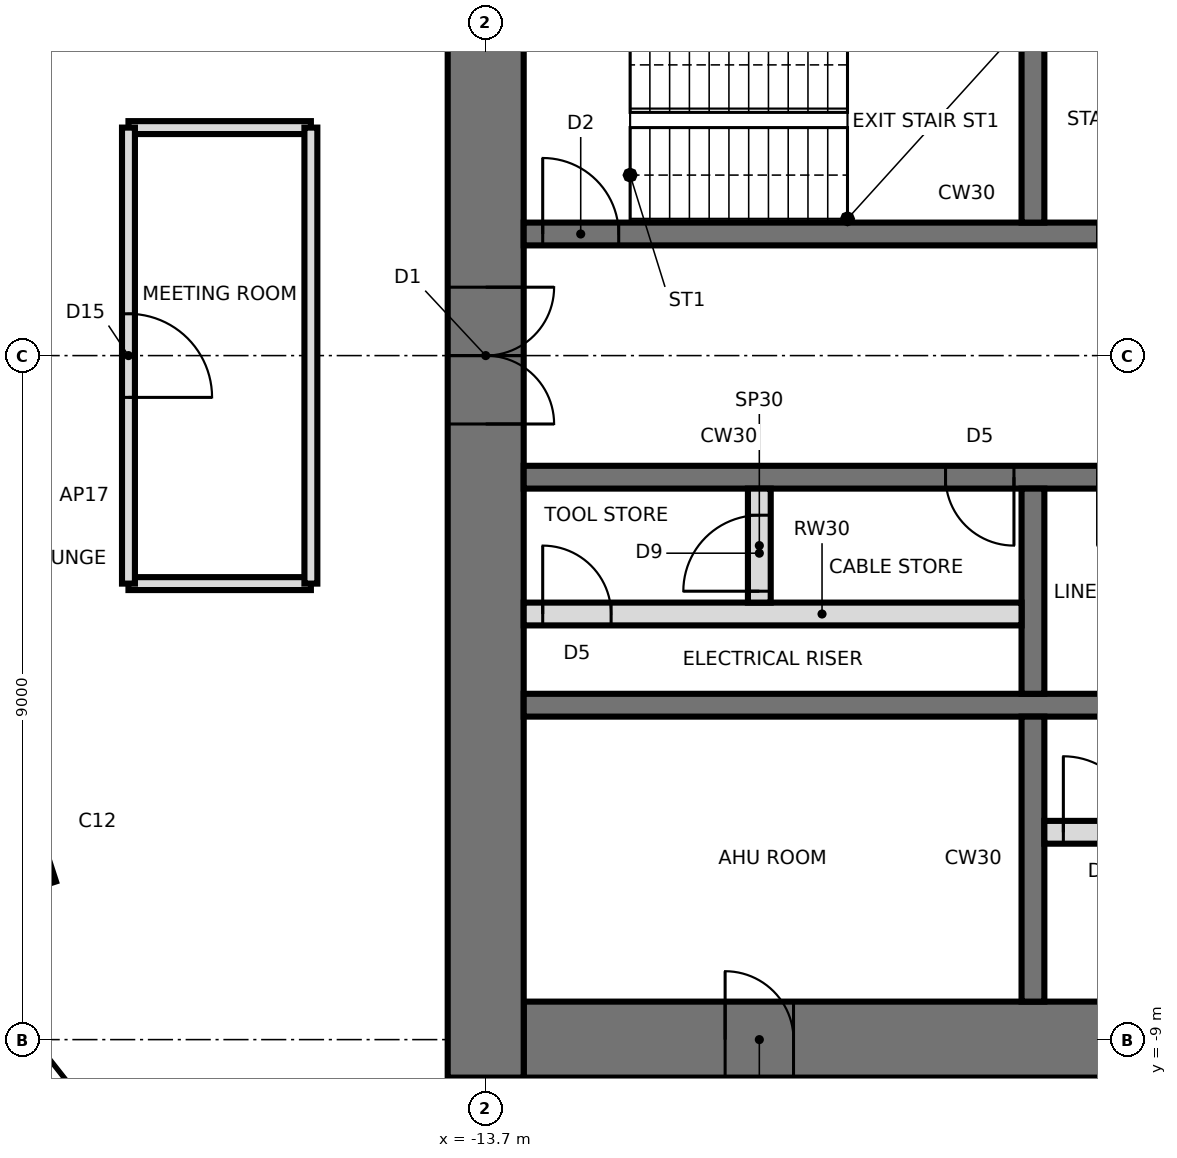
"""IFC4 building model, lengths in metres.
Left out: names, types, materials, properties, quantities, classifications, styles, units other than length and angle.
Written with IfcOpenShell. Run it as: python <this file> out.ifc"""

import sys

from ifc_helpers import new_model, si_unit, direction, frame, frame_2d, origin, origin_2d, place, context, subcontext, project, spatial, rectangle, extrude, element, fill, save


model = new_model("IFC4")
c1 = context("Model", 3, precision=1e-05, world=origin(), true_north=direction((0.0, 1.0)))
c2 = subcontext(c1, "Body", "Model", "MODEL_VIEW")
j1 = project(units=[si_unit("LENGTHUNIT", "METRE"), si_unit("PLANEANGLEUNIT", "RADIAN")], contexts=[c1])
p1 = place(None, origin())
s1 = spatial("IfcSite", under=j1, at=p1, CompositionType="ELEMENT")
p2 = place(p1, origin())
s2 = spatial("IfcBuilding", under=s1, at=p2, CompositionType="ELEMENT")
p3 = place(p2, frame((0.0, 0.0, 256.0)))
s3 = spatial("IfcBuildingStorey", under=s2, at=p3, CompositionType="ELEMENT", Elevation=256.0)
p4 = place(p3, frame((-20.109, -6.534, 0.0), z_axis=(0.0, 0.0, 1.0), x_axis=(-0.951056516295, -0.309016994375, 0.0)))
e1 = element("IfcColumn", 1, at=p4, inside=s3, PredefinedType="COLUMN", context=c2, shape_type="SweptSolid", body=[
    extrude(rectangle(XDim=1.2, YDim=1.2, at=origin_2d()), origin(), (0.0, 0.0, 1.0), 4.2),
])
p5 = place(p3, frame((-13.2, -9.0, 0.0), z_axis=(0.0, 0.0, 1.0), x_axis=(1.0, 0.0, 0.0)))
e2 = element("IfcWall", 2, at=p5, inside=s3, PredefinedType="SHEAR", context=c2, shape_type="SweptSolid", body=[
    extrude(rectangle(XDim=26.4, YDim=1.0, at=frame_2d((13.2, 0.0))), origin(), (0.0, 0.0, 1.0), 4.2),
])
p6 = place(p5, frame((2.65, 0.0, 0.0)))
e3 = element("IfcOpeningElement", 3, at=p6, cuts=e2, PredefinedType="OPENING", context=c2, shape_type="SweptSolid", body=[
    extrude(rectangle(XDim=0.9, YDim=2.1, at=frame_2d((0.45, 1.05))), frame((0.0, 0.51, 0.0), z_axis=(0.0, -1.0, 0.0), x_axis=(1.0, 0.0, 0.0)), (0.0, 0.0, 1.0), 1.02),
])
p7 = place(p5, frame((9.5, 0.0, 0.0)))
e4 = element("IfcOpeningElement", 4, at=p7, cuts=e2, PredefinedType="OPENING", context=c2, shape_type="SweptSolid", body=[
    extrude(rectangle(XDim=0.9, YDim=2.1, at=frame_2d((0.45, 1.05))), frame((0.0, 0.51, 0.0), z_axis=(0.0, -1.0, 0.0), x_axis=(1.0, 0.0, 0.0)), (0.0, 0.0, 1.0), 1.02),
])
p8 = place(p5, frame((16.0, 0.0, 0.0)))
e5 = element("IfcOpeningElement", 5, at=p8, cuts=e2, PredefinedType="OPENING", context=c2, shape_type="SweptSolid", body=[
    extrude(rectangle(XDim=0.9, YDim=2.1, at=frame_2d((0.45, 1.05))), frame((0.0, 0.51, 0.0), z_axis=(0.0, -1.0, 0.0), x_axis=(1.0, 0.0, 0.0)), (0.0, 0.0, 1.0), 1.02),
])
p9 = place(p5, frame((22.85, 0.0, 0.0)))
e6 = element("IfcOpeningElement", 6, at=p9, cuts=e2, PredefinedType="OPENING", context=c2, shape_type="SweptSolid", body=[
    extrude(rectangle(XDim=0.9, YDim=2.1, at=frame_2d((0.45, 1.05))), frame((0.0, 0.51, 0.0), z_axis=(0.0, -1.0, 0.0), x_axis=(1.0, 0.0, 0.0)), (0.0, 0.0, 1.0), 1.02),
])
p10 = place(p3, frame((-13.7, 9.5, 0.0), z_axis=(0.0, 0.0, 1.0), x_axis=(0.0, -1.0, 0.0)))
e7 = element("IfcWall", 7, at=p10, inside=s3, PredefinedType="SHEAR", context=c2, shape_type="SweptSolid", body=[
    extrude(rectangle(XDim=19.0, YDim=1.0, at=frame_2d((9.5, 0.0))), origin(), (0.0, 0.0, 1.0), 4.2),
])
p11 = place(p10, frame((8.6, 0.0, 0.0)))
e8 = element("IfcOpeningElement", 8, at=p11, cuts=e7, PredefinedType="OPENING", context=c2, shape_type="SweptSolid", body=[
    extrude(rectangle(XDim=1.8, YDim=2.4, at=frame_2d((0.9, 1.2))), frame((0.0, 0.51, 0.0), z_axis=(0.0, -1.0, 0.0), x_axis=(1.0, 0.0, 0.0)), (0.0, 0.0, 1.0), 1.02),
])
p12 = place(p3, frame((-13.2, 1.6, 0.0), z_axis=(0.0, 0.0, 1.0), x_axis=(1.0, 0.0, 0.0)))
e9 = element("IfcWall", 9, at=p12, inside=s3, PredefinedType="SHEAR", context=c2, shape_type="SweptSolid", body=[
    extrude(rectangle(XDim=26.4, YDim=0.3, at=frame_2d((13.2, 0.0))), origin(), (0.0, 0.0, 1.0), 4.2),
])
p13 = place(p12, frame((0.25, 0.0, 0.0)))
e10 = element("IfcOpeningElement", 10, at=p13, cuts=e9, PredefinedType="OPENING", context=c2, shape_type="SweptSolid", body=[
    extrude(rectangle(XDim=1.0, YDim=2.1, at=frame_2d((0.5, 1.05))), frame((0.0, 0.16, 0.0), z_axis=(0.0, -1.0, 0.0), x_axis=(1.0, 0.0, 0.0)), (0.0, 0.0, 1.0), 0.32),
])
p14 = place(p12, frame((20.25, 0.0, 0.0)))
e11 = element("IfcOpeningElement", 11, at=p14, cuts=e9, PredefinedType="OPENING", context=c2, shape_type="SweptSolid", body=[
    extrude(rectangle(XDim=1.5, YDim=2.4, at=frame_2d((0.75, 1.2))), frame((0.0, 0.16, 0.0), z_axis=(0.0, -1.0, 0.0), x_axis=(1.0, 0.0, 0.0)), (0.0, 0.0, 1.0), 0.32),
])
p15 = place(p12, frame((7.55, 0.0, 0.0)))
e12 = element("IfcOpeningElement", 12, at=p15, cuts=e9, PredefinedType="OPENING", context=c2, shape_type="SweptSolid", body=[
    extrude(rectangle(XDim=0.9, YDim=2.1, at=frame_2d((0.45, 1.05))), frame((0.0, 0.16, 0.0), z_axis=(0.0, -1.0, 0.0), x_axis=(1.0, 0.0, 0.0)), (0.0, 0.0, 1.0), 0.32),
])
p16 = place(p12, frame((10.15, 0.0, 0.0)))
e13 = element("IfcOpeningElement", 13, at=p16, cuts=e9, PredefinedType="OPENING", context=c2, shape_type="SweptSolid", body=[
    extrude(rectangle(XDim=0.9, YDim=2.1, at=frame_2d((0.45, 1.05))), frame((0.0, 0.16, 0.0), z_axis=(0.0, -1.0, 0.0), x_axis=(1.0, 0.0, 0.0)), (0.0, 0.0, 1.0), 0.32),
])
p17 = place(p12, frame((12.75, 0.0, 0.0)))
e14 = element("IfcOpeningElement", 14, at=p17, cuts=e9, PredefinedType="OPENING", context=c2, shape_type="SweptSolid", body=[
    extrude(rectangle(XDim=0.9, YDim=2.1, at=frame_2d((0.45, 1.05))), frame((0.0, 0.16, 0.0), z_axis=(0.0, -1.0, 0.0), x_axis=(1.0, 0.0, 0.0)), (0.0, 0.0, 1.0), 0.32),
])
p18 = place(p12, frame((15.25, 0.0, 0.0)))
e15 = element("IfcOpeningElement", 15, at=p18, cuts=e9, PredefinedType="OPENING", context=c2, shape_type="SweptSolid", body=[
    extrude(rectangle(XDim=1.1, YDim=2.3, at=frame_2d((0.55, 1.15))), frame((0.0, 0.16, 0.0), z_axis=(0.0, -1.0, 0.0), x_axis=(1.0, 0.0, 0.0)), (0.0, 0.0, 1.0), 0.32),
])
p19 = place(p12, frame((17.85, 0.0, 0.0)))
e16 = element("IfcOpeningElement", 16, at=p19, cuts=e9, PredefinedType="OPENING", context=c2, shape_type="SweptSolid", body=[
    extrude(rectangle(XDim=1.1, YDim=2.3, at=frame_2d((0.55, 1.15))), frame((0.0, 0.16, 0.0), z_axis=(0.0, -1.0, 0.0), x_axis=(1.0, 0.0, 0.0)), (0.0, 0.0, 1.0), 0.32),
])
p20 = place(p12, frame((24.15, 0.0, 0.0)))
e17 = element("IfcOpeningElement", 17, at=p20, cuts=e9, PredefinedType="OPENING", context=c2, shape_type="SweptSolid", body=[
    extrude(rectangle(XDim=0.9, YDim=2.1, at=frame_2d((0.45, 1.05))), frame((0.0, 0.16, 0.0), z_axis=(0.0, -1.0, 0.0), x_axis=(1.0, 0.0, 0.0)), (0.0, 0.0, 1.0), 0.32),
])
p21 = place(p3, frame((-13.2, -1.6, 0.0), z_axis=(0.0, 0.0, 1.0), x_axis=(1.0, 0.0, 0.0)))
e18 = element("IfcWall", 18, at=p21, inside=s3, PredefinedType="SHEAR", context=c2, shape_type="SweptSolid", body=[
    extrude(rectangle(XDim=26.4, YDim=0.3, at=frame_2d((13.2, 0.0))), origin(), (0.0, 0.0, 1.0), 4.2),
])
p22 = place(p21, frame((25.15, 0.0, 0.0)))
e19 = element("IfcOpeningElement", 19, at=p22, cuts=e18, PredefinedType="OPENING", context=c2, shape_type="SweptSolid", body=[
    extrude(rectangle(XDim=1.0, YDim=2.1, at=frame_2d((0.5, 1.05))), frame((0.0, 0.16, 0.0), z_axis=(0.0, -1.0, 0.0), x_axis=(1.0, 0.0, 0.0)), (0.0, 0.0, 1.0), 0.32),
])
p23 = place(p21, frame((7.55, 0.0, 0.0)))
e20 = element("IfcOpeningElement", 20, at=p23, cuts=e18, PredefinedType="OPENING", context=c2, shape_type="SweptSolid", body=[
    extrude(rectangle(XDim=0.9, YDim=2.1, at=frame_2d((0.45, 1.05))), frame((0.0, 0.16, 0.0), z_axis=(0.0, -1.0, 0.0), x_axis=(1.0, 0.0, 0.0)), (0.0, 0.0, 1.0), 0.32),
])
p24 = place(p21, frame((10.15, 0.0, 0.0)))
e21 = element("IfcOpeningElement", 21, at=p24, cuts=e18, PredefinedType="OPENING", context=c2, shape_type="SweptSolid", body=[
    extrude(rectangle(XDim=0.9, YDim=2.1, at=frame_2d((0.45, 1.05))), frame((0.0, 0.16, 0.0), z_axis=(0.0, -1.0, 0.0), x_axis=(1.0, 0.0, 0.0)), (0.0, 0.0, 1.0), 0.32),
])
p25 = place(p21, frame((12.75, 0.0, 0.0)))
e22 = element("IfcOpeningElement", 22, at=p25, cuts=e18, PredefinedType="OPENING", context=c2, shape_type="SweptSolid", body=[
    extrude(rectangle(XDim=0.9, YDim=2.1, at=frame_2d((0.45, 1.05))), frame((0.0, 0.16, 0.0), z_axis=(0.0, -1.0, 0.0), x_axis=(1.0, 0.0, 0.0)), (0.0, 0.0, 1.0), 0.32),
])
p26 = place(p21, frame((15.25, 0.0, 0.0)))
e23 = element("IfcOpeningElement", 23, at=p26, cuts=e18, PredefinedType="OPENING", context=c2, shape_type="SweptSolid", body=[
    extrude(rectangle(XDim=1.1, YDim=2.3, at=frame_2d((0.55, 1.15))), frame((0.0, 0.16, 0.0), z_axis=(0.0, -1.0, 0.0), x_axis=(1.0, 0.0, 0.0)), (0.0, 0.0, 1.0), 0.32),
])
p27 = place(p21, frame((17.85, 0.0, 0.0)))
e24 = element("IfcOpeningElement", 24, at=p27, cuts=e18, PredefinedType="OPENING", context=c2, shape_type="SweptSolid", body=[
    extrude(rectangle(XDim=1.1, YDim=2.3, at=frame_2d((0.55, 1.15))), frame((0.0, 0.16, 0.0), z_axis=(0.0, -1.0, 0.0), x_axis=(1.0, 0.0, 0.0)), (0.0, 0.0, 1.0), 0.32),
])
p28 = place(p21, frame((5.55, 0.0, 0.0)))
e25 = element("IfcOpeningElement", 25, at=p28, cuts=e18, PredefinedType="OPENING", context=c2, shape_type="SweptSolid", body=[
    extrude(rectangle(XDim=0.9, YDim=2.1, at=frame_2d((0.45, 1.05))), frame((0.0, 0.16, 0.0), z_axis=(0.0, -1.0, 0.0), x_axis=(1.0, 0.0, 0.0)), (0.0, 0.0, 1.0), 0.32),
])
p29 = place(p3, frame((-13.2, -4.6, 0.0), z_axis=(0.0, 0.0, 1.0), x_axis=(1.0, 0.0, 0.0)))
e26 = element("IfcWall", 26, at=p29, inside=s3, PredefinedType="SHEAR", context=c2, shape_type="SweptSolid", body=[
    extrude(rectangle(XDim=26.4, YDim=0.3, at=frame_2d((13.2, 0.0))), origin(), (0.0, 0.0, 1.0), 4.2),
])
for number, where, z_axis, x_axis in (
    (27, (-6.5, 1.75, 0.0), (0.0, 0.0, 1.0), (0.0, 1.0, 0.0)),
    (28, (-6.5, -1.75, 0.0), (0.0, 0.0, 1.0), (0.0, -1.0, 0.0)),
):
    element("IfcWall", number, at=place(p3, frame(where, z_axis=z_axis, x_axis=x_axis)), inside=s3, PredefinedType="SHEAR", context=c2, shape_type="SweptSolid", body=[
        extrude(rectangle(XDim=2.7, YDim=0.3, at=frame_2d((1.35, 0.0))), origin(), (0.0, 0.0, 1.0), 4.2),
    ])
p30 = place(p3, frame((-6.5, -4.75, 0.0), z_axis=(0.0, 0.0, 1.0), x_axis=(0.0, -1.0, 0.0)))
e29 = element("IfcWall", 29, at=p30, inside=s3, PredefinedType="SHEAR", context=c2, shape_type="SweptSolid", body=[
    extrude(rectangle(XDim=3.75, YDim=0.3, at=frame_2d((1.875, 0.0))), origin(), (0.0, 0.0, 1.0), 4.2),
])
p31 = place(p3, frame((-6.35, -6.272, 0.0), z_axis=(0.0, 0.0, 1.0), x_axis=(1.0, 0.0, 0.0)))
e30 = element("IfcWall", 30, at=p31, inside=s3, PredefinedType="PARTITIONING", context=c2, shape_type="SweptSolid", body=[
    extrude(rectangle(XDim=6.2, YDim=0.3, at=frame_2d((3.1, 0.0))), origin(), (0.0, 0.0, 1.0), 4.04),
])
p32 = place(p31, frame((0.25, 0.0, 0.0)))
e31 = element("IfcOpeningElement", 31, at=p32, cuts=e30, PredefinedType="OPENING", context=c2, shape_type="SweptSolid", body=[
    extrude(rectangle(XDim=1.0, YDim=2.4, at=frame_2d((0.5, 1.2))), frame((0.0, 0.16, 0.0), z_axis=(0.0, -1.0, 0.0), x_axis=(1.0, 0.0, 0.0)), (0.0, 0.0, 1.0), 0.32),
])
p33 = place(p3, frame((-13.2, -3.4, 0.0), z_axis=(0.0, 0.0, 1.0), x_axis=(1.0, 0.0, 0.0)))
e32 = element("IfcWall", 32, at=p33, inside=s3, PredefinedType="SOLIDWALL", context=c2, shape_type="SweptSolid", body=[
    extrude(rectangle(XDim=6.55, YDim=0.3, at=frame_2d((3.275, 0.0))), origin(), (0.0, 0.0, 1.0), 4.04),
])
p34 = place(p33, frame((0.25, 0.0, 0.0)))
e33 = element("IfcOpeningElement", 33, at=p34, cuts=e32, PredefinedType="OPENING", context=c2, shape_type="SweptSolid", body=[
    extrude(rectangle(XDim=0.9, YDim=2.1, at=frame_2d((0.45, 1.05))), frame((0.0, 0.16, 0.0), z_axis=(0.0, -1.0, 0.0), x_axis=(1.0, 0.0, 0.0)), (0.0, 0.0, 1.0), 0.32),
])
p35 = place(p3, frame((-10.1, -3.25, 0.0), z_axis=(0.0, 0.0, 1.0), x_axis=(0.0, 1.0, 0.0)))
e34 = element("IfcWall", 34, at=p35, inside=s3, PredefinedType="PARTITIONING", context=c2, shape_type="SweptSolid", body=[
    extrude(rectangle(XDim=1.5, YDim=0.3, at=frame_2d((0.75, 0.0))), origin(), (0.0, 0.0, 1.0), 4.04),
])
p36 = place(p35, frame((0.15, 0.0, 0.0)))
e35 = element("IfcOpeningElement", 35, at=p36, cuts=e34, PredefinedType="OPENING", context=c2, shape_type="SweptSolid", body=[
    extrude(rectangle(XDim=1.0, YDim=2.4, at=frame_2d((0.5, 1.2))), frame((0.0, 0.16, 0.0), z_axis=(0.0, -1.0, 0.0), x_axis=(1.0, 0.0, 0.0)), (0.0, 0.0, 1.0), 0.32),
])
for number, where, z_axis, x_axis in (
    (36, (-16.0, -3.0, 0.0), (0.0, 0.0, 1.0), (-1.0, 0.0, 0.0)),
    (37, (-18.4, 3.0, 0.0), (0.0, 0.0, 1.0), (1.0, 0.0, 0.0)),
):
    element("IfcWall", number, at=place(p3, frame(where, z_axis=z_axis, x_axis=x_axis)), inside=s3, PredefinedType="PARTITIONING", context=c2, shape_type="SweptSolid", body=[
        extrude(rectangle(XDim=2.4, YDim=0.17, at=frame_2d((1.2, 0.0))), origin(), (0.0, 0.0, 1.0), 4.04),
    ])
p37 = place(p3, frame((-18.4, -3.0, 0.0), z_axis=(0.0, 0.0, 1.0), x_axis=(0.0, 1.0, 0.0)))
e38 = element("IfcWall", 38, at=p37, inside=s3, PredefinedType="PARTITIONING", context=c2, shape_type="SweptSolid", body=[
    extrude(rectangle(XDim=6.0, YDim=0.17, at=frame_2d((3.0, 0.0))), origin(), (0.0, 0.0, 1.0), 4.04),
])
p38 = place(p37, frame((2.45, 0.0, 0.0)))
e39 = element("IfcOpeningElement", 39, at=p38, cuts=e38, PredefinedType="OPENING", context=c2, shape_type="SweptSolid", body=[
    extrude(rectangle(XDim=1.1, YDim=2.4, at=frame_2d((0.55, 1.2))), frame((0.0, 0.095, 0.0), z_axis=(0.0, -1.0, 0.0), x_axis=(1.0, 0.0, 0.0)), (0.0, 0.0, 1.0), 0.19),
])
p39 = place(p3, frame((-16.0, 3.0, 0.0), z_axis=(0.0, 0.0, 1.0), x_axis=(0.0, -1.0, 0.0)))
e40 = element("IfcWall", 40, at=p39, inside=s3, PredefinedType="PARTITIONING", context=c2, shape_type="SweptSolid", body=[
    extrude(rectangle(XDim=6.0, YDim=0.17, at=frame_2d((3.0, 0.0))), origin(), (0.0, 0.0, 1.0), 4.04),
])
p40 = place(p11, origin())
e41 = element("IfcDoor", 41, at=p40, inside=s3, OperationType="DOUBLE_DOOR_SINGLE_SWING", PredefinedType="DOOR", context=c2, shape_type="SweptSolid", body=[
    extrude(rectangle(XDim=1.72, YDim=2.36, at=frame_2d((0.9, 1.18))), frame((0.0, 0.025, 0.0), z_axis=(0.0, -1.0, 0.0), x_axis=(1.0, 0.0, 0.0)), (0.0, 0.0, 1.0), 0.05),
    extrude(rectangle(XDim=0.04, YDim=2.4, at=frame_2d((0.02, 1.2))), frame((0.0, 0.25, 0.0), z_axis=(0.0, -1.0, 0.0), x_axis=(1.0, 0.0, 0.0)), (0.0, 0.0, 1.0), 0.5),
    extrude(rectangle(XDim=0.04, YDim=2.4, at=frame_2d((1.78, 1.2))), frame((0.0, 0.25, 0.0), z_axis=(0.0, -1.0, 0.0), x_axis=(1.0, 0.0, 0.0)), (0.0, 0.0, 1.0), 0.5),
    extrude(rectangle(XDim=1.72, YDim=0.04, at=frame_2d((0.9, 2.38))), frame((0.0, 0.25, 0.0), z_axis=(0.0, -1.0, 0.0), x_axis=(1.0, 0.0, 0.0)), (0.0, 0.0, 1.0), 0.5),
])
fill(e8, e41)
p41 = place(p13, origin())
e42 = element("IfcDoor", 42, at=p41, inside=s3, OperationType="SINGLE_SWING_LEFT", PredefinedType="DOOR", context=c2, shape_type="SweptSolid", body=[
    extrude(rectangle(XDim=1.0, YDim=2.1, at=frame_2d((0.5, 1.05))), frame((0.0, 0.025, 0.0), z_axis=(0.0, -1.0, 0.0), x_axis=(1.0, 0.0, 0.0)), (0.0, 0.0, 1.0), 0.05),
])
fill(e10, e42)
p42 = place(p28, frame((0.9, 0.0, 0.0), z_axis=(0.0, 0.0, 1.0), x_axis=(-1.0, 0.0, 0.0)))
e43 = element("IfcDoor", 43, at=p42, inside=s3, OperationType="SINGLE_SWING_LEFT", PredefinedType="DOOR", context=c2, shape_type="SweptSolid", body=[
    extrude(rectangle(XDim=0.9, YDim=2.1, at=frame_2d((0.45, 1.05))), frame((0.0, 0.025, 0.0), z_axis=(0.0, -1.0, 0.0), x_axis=(1.0, 0.0, 0.0)), (0.0, 0.0, 1.0), 0.05),
])
fill(e25, e43)
p43 = place(p6, origin())
e44 = element("IfcDoor", 44, at=p43, inside=s3, OperationType="SINGLE_SWING_LEFT", PredefinedType="DOOR", context=c2, shape_type="SweptSolid", body=[
    extrude(rectangle(XDim=0.82, YDim=2.06, at=frame_2d((0.45, 1.03))), frame((0.0, 0.025, 0.0), z_axis=(0.0, -1.0, 0.0), x_axis=(1.0, 0.0, 0.0)), (0.0, 0.0, 1.0), 0.05),
    extrude(rectangle(XDim=0.04, YDim=2.1, at=frame_2d((0.02, 1.05))), frame((0.0, 0.25, 0.0), z_axis=(0.0, -1.0, 0.0), x_axis=(1.0, 0.0, 0.0)), (0.0, 0.0, 1.0), 0.5),
    extrude(rectangle(XDim=0.04, YDim=2.1, at=frame_2d((0.88, 1.05))), frame((0.0, 0.25, 0.0), z_axis=(0.0, -1.0, 0.0), x_axis=(1.0, 0.0, 0.0)), (0.0, 0.0, 1.0), 0.5),
    extrude(rectangle(XDim=0.82, YDim=0.04, at=frame_2d((0.45, 2.08))), frame((0.0, 0.25, 0.0), z_axis=(0.0, -1.0, 0.0), x_axis=(1.0, 0.0, 0.0)), (0.0, 0.0, 1.0), 0.5),
])
fill(e3, e44)
p44 = place(p32, origin())
e45 = element("IfcDoor", 45, at=p44, inside=s3, OperationType="SINGLE_SWING_LEFT", PredefinedType="DOOR", context=c2, shape_type="SweptSolid", body=[
    extrude(rectangle(XDim=1.0, YDim=2.4, at=frame_2d((0.5, 1.2))), frame((0.0, 0.025, 0.0), z_axis=(0.0, -1.0, 0.0), x_axis=(1.0, 0.0, 0.0)), (0.0, 0.0, 1.0), 0.05),
])
fill(e31, e45)
p45 = place(p34, origin())
e46 = element("IfcDoor", 46, at=p45, inside=s3, OperationType="SINGLE_SWING_LEFT", PredefinedType="DOOR", context=c2, shape_type="SweptSolid", body=[
    extrude(rectangle(XDim=0.9, YDim=2.1, at=frame_2d((0.45, 1.05))), frame((0.0, 0.025, 0.0), z_axis=(0.0, -1.0, 0.0), x_axis=(1.0, 0.0, 0.0)), (0.0, 0.0, 1.0), 0.05),
])
fill(e33, e46)
p46 = place(p36, origin())
e47 = element("IfcDoor", 47, at=p46, inside=s3, OperationType="SINGLE_SWING_LEFT", PredefinedType="DOOR", context=c2, shape_type="SweptSolid", body=[
    extrude(rectangle(XDim=1.0, YDim=2.4, at=frame_2d((0.5, 1.2))), frame((0.0, 0.025, 0.0), z_axis=(0.0, -1.0, 0.0), x_axis=(1.0, 0.0, 0.0)), (0.0, 0.0, 1.0), 0.05),
])
fill(e35, e47)
p47 = place(p38, frame((1.1, 0.0, 0.0), z_axis=(0.0, 0.0, 1.0), x_axis=(-1.0, 0.0, 0.0)))
e48 = element("IfcDoor", 48, at=p47, inside=s3, OperationType="SINGLE_SWING_RIGHT", PredefinedType="DOOR", context=c2, shape_type="SweptSolid", body=[
    extrude(rectangle(XDim=1.1, YDim=2.4, at=frame_2d((0.55, 1.2))), frame((0.0, 0.025, 0.0), z_axis=(0.0, -1.0, 0.0), x_axis=(1.0, 0.0, 0.0)), (0.0, 0.0, 1.0), 0.05),
])
fill(e39, e48)
save(model, sys.argv[1])
